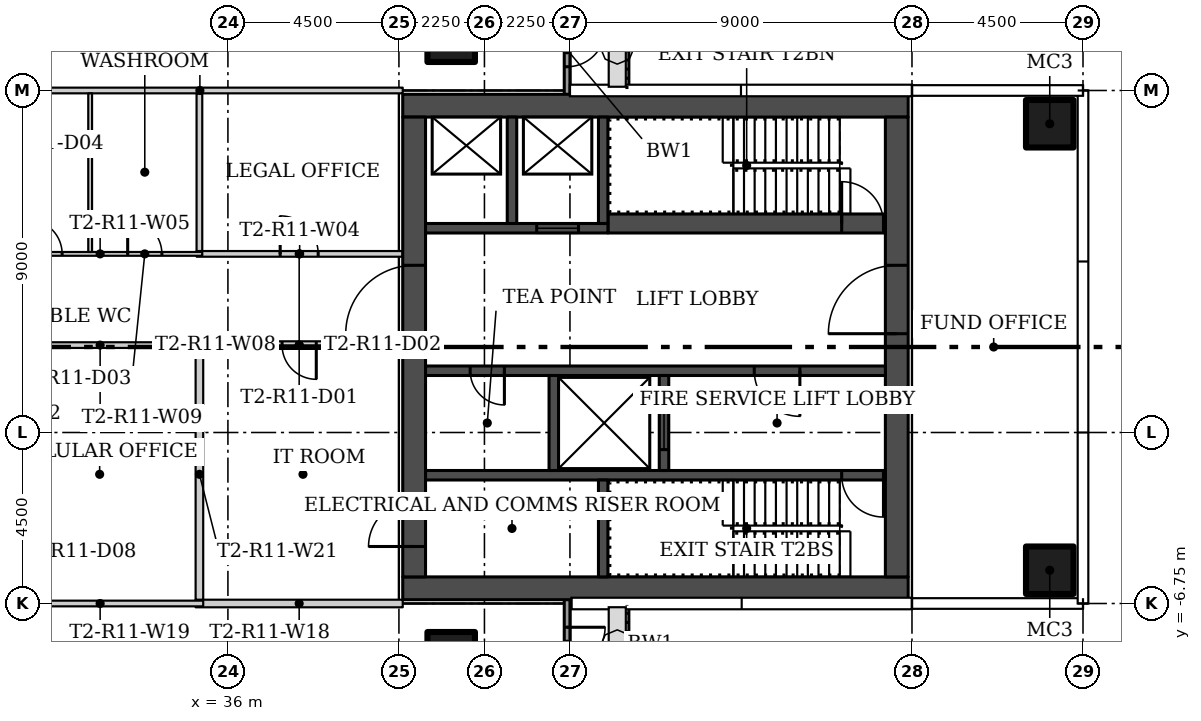
"""IFC4 building model, lengths in metres.
Left out: names, types, materials, properties, quantities, classifications, styles, units other than length and angle.
Written with IfcOpenShell. Run it as: python <this file> out.ifc"""

import sys

from ifc_helpers import new_model, si_unit, direction, frame, frame_2d, origin, origin_2d, place, context, subcontext, project, spatial, rectangle, hollow_rectangle, extrude, element, fill, save


model = new_model("IFC4")
c1 = context("Model", 3, precision=1e-05, world=origin(), true_north=direction((0.0, 1.0)))
c2 = subcontext(c1, "Body", "Model", "MODEL_VIEW")
j1 = project(units=[si_unit("LENGTHUNIT", "METRE"), si_unit("PLANEANGLEUNIT", "RADIAN")], contexts=[c1])
p1 = place(None, origin())
s1 = spatial("IfcSite", under=j1, at=p1, CompositionType="ELEMENT")
p2 = place(p1, origin())
s2 = spatial("IfcBuilding", under=s1, at=p2, CompositionType="ELEMENT")
p3 = place(p2, frame((0.0, 0.0, 109.2)))
s3 = spatial("IfcBuildingStorey", under=s2, at=p3, CompositionType="ELEMENT", Elevation=109.2)
for number, where in (
    (1, (41.875, 8.125, 0.0)),
    (2, (41.875, -8.125, 0.0)),
    (3, (57.625, -5.875, 0.0)),
    (4, (57.625, 5.875, 0.0)),
):
    element("IfcColumn", number, at=place(p3, frame(where)), inside=s3, PredefinedType="COLUMN", context=c2, shape_type="SweptSolid", body=[
        extrude(hollow_rectangle(XDim=1.25, YDim=1.25, WallThickness=0.05, at=origin_2d()), origin(), (0.0, 0.0, 1.0), 3.55),
    ])
p4 = place(p3, frame((35.175, 2.45, 0.0)))
e5 = element("IfcWall", 5, at=p4, inside=s3, PredefinedType="PARTITIONING", context=c2, shape_type="SweptSolid", body=[
    extrude(rectangle(XDim=5.425, YDim=0.15, at=frame_2d((2.712, 0.0))), origin(), (0.0, 0.0, 1.0), 3.55),
])
p5 = place(p4, frame((2.2, 0.0, 0.0)))
e6 = element("IfcOpeningElement", 6, at=p5, cuts=e5, PredefinedType="OPENING", context=c2, shape_type="SweptSolid", body=[
    extrude(rectangle(XDim=1.0, YDim=2.4, at=frame_2d((0.5, 1.2))), frame((0.0, 0.085, 0.0), z_axis=(0.0, -1.0, 0.0), x_axis=(1.0, 0.0, 0.0)), (0.0, 0.0, 1.0), 0.17),
])
p6 = place(p3, frame((29.95, 2.45, 0.0)))
e7 = element("IfcWall", 7, at=p6, inside=s3, PredefinedType="PARTITIONING", context=c2, shape_type="SweptSolid", body=[
    extrude(rectangle(XDim=5.375, YDim=0.1, at=frame_2d((2.688, 0.0))), origin(), (0.0, 0.0, 1.0), 3.55),
])
p7 = place(p6, frame((3.413, 0.0, 0.0)))
e8 = element("IfcOpeningElement", 8, at=p7, cuts=e7, PredefinedType="OPENING", context=c2, shape_type="SweptSolid", body=[
    extrude(rectangle(XDim=0.9, YDim=2.1, at=frame_2d((0.45, 1.05))), frame((0.0, 0.06, 0.0), z_axis=(0.0, -1.0, 0.0), x_axis=(1.0, 0.0, 0.0)), (0.0, 0.0, 1.0), 0.12),
])
p8 = place(p6, frame((0.788, 0.0, 0.0)))
e9 = element("IfcOpeningElement", 9, at=p8, cuts=e7, PredefinedType="OPENING", context=c2, shape_type="SweptSolid", body=[
    extrude(rectangle(XDim=0.9, YDim=2.1, at=frame_2d((0.45, 1.05))), frame((0.0, 0.06, 0.0), z_axis=(0.0, -1.0, 0.0), x_axis=(1.0, 0.0, 0.0)), (0.0, 0.0, 1.0), 0.12),
])
p9 = place(p3, frame((40.6, 0.05, 0.0), z_axis=(0.0, 0.0, 1.0), x_axis=(-1.0, 0.0, 0.0)))
e10 = element("IfcWall", 10, at=p9, inside=s3, PredefinedType="PARTITIONING", context=c2, shape_type="SweptSolid", body=[
    extrude(rectangle(XDim=5.45, YDim=0.2, at=frame_2d((2.725, 0.0))), origin(), (0.0, 0.0, 1.0), 3.55),
])
p10 = place(p9, frame((2.275, 0.0, 0.0)))
e11 = element("IfcOpeningElement", 11, at=p10, cuts=e10, PredefinedType="OPENING", context=c2, shape_type="SweptSolid", body=[
    extrude(rectangle(XDim=0.9, YDim=2.1, at=frame_2d((0.45, 1.05))), frame((0.0, 0.11, 0.0), z_axis=(0.0, -1.0, 0.0), x_axis=(1.0, 0.0, 0.0)), (0.0, 0.0, 1.0), 0.22),
])
p11 = place(p3, frame((35.35, 0.05, 0.0), z_axis=(0.0, 0.0, 1.0), x_axis=(-1.0, 0.0, 0.0)))
e12 = element("IfcWall", 12, at=p11, inside=s3, PredefinedType="PARTITIONING", context=c2, shape_type="SweptSolid", body=[
    extrude(rectangle(XDim=5.425, YDim=0.15, at=frame_2d((2.712, 0.0))), origin(), (0.0, 0.0, 1.0), 3.55),
])
p12 = place(p3, frame((29.925, 6.75, 0.0)))
e13 = element("IfcWall", 13, at=p12, inside=s3, PredefinedType="PARTITIONING", context=c2, shape_type="SweptSolid", body=[
    extrude(rectangle(XDim=10.675, YDim=0.15, at=frame_2d((5.337, 0.0))), origin(), (0.0, 0.0, 1.0), 3.55),
])
p13 = place(p3, frame((35.25, 6.675, 0.0), z_axis=(0.0, 0.0, 1.0), x_axis=(0.0, -1.0, 0.0)))
e14 = element("IfcWall", 14, at=p13, inside=s3, PredefinedType="PARTITIONING", context=c2, shape_type="SweptSolid", body=[
    extrude(rectangle(XDim=4.15, YDim=0.15, at=frame_2d((2.075, 0.0))), origin(), (0.0, 0.0, 1.0), 3.55),
])
p14 = place(p3, frame((32.375, 6.675, 0.0), z_axis=(0.0, 0.0, 1.0), x_axis=(0.0, -1.0, 0.0)))
e15 = element("IfcWall", 15, at=p14, inside=s3, PredefinedType="PARTITIONING", context=c2, shape_type="SweptSolid", body=[
    extrude(rectangle(XDim=4.175, YDim=0.1, at=frame_2d((2.087, 0.0))), origin(), (0.0, 0.0, 1.0), 3.55),
])
p15 = place(p3, frame((40.6, -6.75, 0.0), z_axis=(0.0, 0.0, 1.0), x_axis=(-1.0, 0.0, 0.0)))
e16 = element("IfcWall", 16, at=p15, inside=s3, PredefinedType="PARTITIONING", context=c2, shape_type="SweptSolid", body=[
    extrude(rectangle(XDim=5.45, YDim=0.2, at=frame_2d((2.725, 0.0))), origin(), (0.0, 0.0, 1.0), 3.55),
])
p16 = place(p3, frame((35.35, -6.75, 0.0), z_axis=(0.0, 0.0, 1.0), x_axis=(-1.0, 0.0, 0.0)))
e17 = element("IfcWall", 17, at=p16, inside=s3, PredefinedType="PARTITIONING", context=c2, shape_type="SweptSolid", body=[
    extrude(rectangle(XDim=5.425, YDim=0.15, at=frame_2d((2.712, 0.0))), origin(), (0.0, 0.0, 1.0), 3.55),
])
p17 = place(p3, frame((35.25, -0.05, 0.0), z_axis=(0.0, 0.0, 1.0), x_axis=(0.0, -1.0, 0.0)))
e18 = element("IfcWall", 18, at=p17, inside=s3, PredefinedType="PARTITIONING", context=c2, shape_type="SweptSolid", body=[
    extrude(rectangle(XDim=6.6, YDim=0.2, at=frame_2d((3.3, 0.0))), origin(), (0.0, 0.0, 1.0), 3.55),
])
p18 = place(p3, frame((44.925, 9.0, 0.0), z_axis=(0.0, 0.0, 1.0), x_axis=(0.0, -1.0, 0.0)))
e19 = element("IfcWall", 19, at=p18, inside=s3, PredefinedType="SOLIDWALL", context=c2, shape_type="SweptSolid", body=[
    extrude(rectangle(XDim=2.357, YDim=0.15, at=frame_2d((1.178, 0.0))), origin(), (0.0, 0.0, 1.0), 3.45),
])
p19 = place(p18, frame((0.625, 0.0, 0.0)))
e20 = element("IfcOpeningElement", 20, at=p19, cuts=e19, PredefinedType="OPENING", context=c2, shape_type="SweptSolid", body=[
    extrude(rectangle(XDim=1.0, YDim=2.4, at=frame_2d((0.5, 1.2))), frame((0.0, 0.085, 0.0), z_axis=(0.0, -1.0, 0.0), x_axis=(1.0, 0.0, 0.0)), (0.0, 0.0, 1.0), 0.17),
])
p20 = place(p3, frame((44.925, -6.643, 0.0), z_axis=(0.0, 0.0, 1.0), x_axis=(0.0, -1.0, 0.0)))
e21 = element("IfcWall", 21, at=p20, inside=s3, PredefinedType="SOLIDWALL", context=c2, shape_type="SweptSolid", body=[
    extrude(rectangle(XDim=2.357, YDim=0.15, at=frame_2d((1.178, 0.0))), origin(), (0.0, 0.0, 1.0), 3.45),
])
p21 = place(p20, frame((0.732, 0.0, 0.0)))
e22 = element("IfcOpeningElement", 22, at=p21, cuts=e21, PredefinedType="OPENING", context=c2, shape_type="SweptSolid", body=[
    extrude(rectangle(XDim=1.0, YDim=2.4, at=frame_2d((0.5, 1.2))), frame((0.0, 0.085, 0.0), z_axis=(0.0, -1.0, 0.0), x_axis=(1.0, 0.0, 0.0)), (0.0, 0.0, 1.0), 0.17),
])
for number, where, z_axis, x_axis in (
    (23, (53.9, -6.35, 0.0), (0.0, 0.0, 1.0), (-1.0, 0.0, 0.0)),
    (24, (53.9, 6.35, 0.0), (0.0, 0.0, 1.0), (-1.0, 0.0, 0.0)),
):
    element("IfcWall", number, at=place(p3, frame(where, z_axis=z_axis, x_axis=x_axis)), inside=s3, PredefinedType="SHEAR", context=c2, shape_type="SweptSolid", body=[
        extrude(rectangle(XDim=13.3, YDim=0.6, at=frame_2d((6.65, 0.0))), origin(), (0.0, 0.0, 1.0), 3.55),
    ])
p22 = place(p3, frame((53.6, -6.05, 0.0), z_axis=(0.0, 0.0, 1.0), x_axis=(0.0, 1.0, 0.0)))
e25 = element("IfcWall", 25, at=p22, inside=s3, PredefinedType="SHEAR", context=c2, shape_type="SweptSolid", body=[
    extrude(rectangle(XDim=12.1, YDim=0.6, at=frame_2d((6.05, 0.0))), origin(), (0.0, 0.0, 1.0), 3.55),
])
p23 = place(p22, frame((6.4, 0.0, 0.0)))
e26 = element("IfcOpeningElement", 26, at=p23, cuts=e25, PredefinedType="OPENING", context=c2, shape_type="SweptSolid", body=[
    extrude(rectangle(XDim=1.8, YDim=2.4, at=frame_2d((0.9, 1.2))), frame((0.0, 0.31, 0.0), z_axis=(0.0, -1.0, 0.0), x_axis=(1.0, 0.0, 0.0)), (0.0, 0.0, 1.0), 0.62),
])
p24 = place(p3, frame((40.9, -6.05, 0.0), z_axis=(0.0, 0.0, 1.0), x_axis=(0.0, 1.0, 0.0)))
e27 = element("IfcWall", 27, at=p24, inside=s3, PredefinedType="SHEAR", context=c2, shape_type="SweptSolid", body=[
    extrude(rectangle(XDim=12.1, YDim=0.6, at=frame_2d((6.05, 0.0))), origin(), (0.0, 0.0, 1.0), 3.55),
])
p25 = place(p24, frame((0.8, 0.0, 0.0)))
e28 = element("IfcOpeningElement", 28, at=p25, cuts=e27, PredefinedType="OPENING", context=c2, shape_type="SweptSolid", body=[
    extrude(rectangle(XDim=1.2, YDim=2.1, at=frame_2d((0.6, 1.05))), frame((0.0, 0.31, 0.0), z_axis=(0.0, -1.0, 0.0), x_axis=(1.0, 0.0, 0.0)), (0.0, 0.0, 1.0), 0.62),
])
p26 = place(p24, frame((6.4, 0.0, 0.0)))
e29 = element("IfcOpeningElement", 29, at=p26, cuts=e27, PredefinedType="OPENING", context=c2, shape_type="SweptSolid", body=[
    extrude(rectangle(XDim=1.8, YDim=2.4, at=frame_2d((0.9, 1.2))), frame((0.0, 0.31, 0.0), z_axis=(0.0, -1.0, 0.0), x_axis=(1.0, 0.0, 0.0)), (0.0, 0.0, 1.0), 0.62),
])
p27 = place(p3, frame((53.3, -3.375, 0.0), z_axis=(0.0, 0.0, 1.0), x_axis=(-1.0, 0.0, 0.0)))
e30 = element("IfcWall", 30, at=p27, inside=s3, PredefinedType="SHEAR", context=c2, shape_type="SweptSolid", body=[
    extrude(rectangle(XDim=12.1, YDim=0.25, at=frame_2d((6.05, 0.0))), origin(), (0.0, 0.0, 1.0), 3.55),
])
p28 = place(p27, frame((0.05, 0.0, 0.0)))
e31 = element("IfcOpeningElement", 31, at=p28, cuts=e30, PredefinedType="OPENING", context=c2, shape_type="SweptSolid", body=[
    extrude(rectangle(XDim=1.1, YDim=2.1, at=frame_2d((0.55, 1.05))), frame((0.0, 0.135, 0.0), z_axis=(0.0, -1.0, 0.0), x_axis=(1.0, 0.0, 0.0)), (0.0, 0.0, 1.0), 0.27),
])
p29 = place(p3, frame((45.875, -6.05, 0.0), z_axis=(0.0, 0.0, 1.0), x_axis=(0.0, 1.0, 0.0)))
e32 = element("IfcWall", 32, at=p29, inside=s3, PredefinedType="SHEAR", context=c2, shape_type="SweptSolid", body=[
    extrude(rectangle(XDim=2.55, YDim=0.25, at=frame_2d((1.275, 0.0))), origin(), (0.0, 0.0, 1.0), 3.55),
])
p30 = place(p3, frame((53.3, -0.625, 0.0), z_axis=(0.0, 0.0, 1.0), x_axis=(-1.0, 0.0, 0.0)))
e33 = element("IfcWall", 33, at=p30, inside=s3, PredefinedType="SHEAR", context=c2, shape_type="SweptSolid", body=[
    extrude(rectangle(XDim=12.1, YDim=0.25, at=frame_2d((6.05, 0.0))), origin(), (0.0, 0.0, 1.0), 3.55),
])
p31 = place(p30, frame((2.25, 0.0, 0.0)))
e34 = element("IfcOpeningElement", 34, at=p31, cuts=e33, PredefinedType="OPENING", context=c2, shape_type="SweptSolid", body=[
    extrude(rectangle(XDim=1.2, YDim=2.1, at=frame_2d((0.6, 1.05))), frame((0.0, 0.135, 0.0), z_axis=(0.0, -1.0, 0.0), x_axis=(1.0, 0.0, 0.0)), (0.0, 0.0, 1.0), 0.27),
])
p32 = place(p30, frame((10.025, 0.0, 0.0)))
e35 = element("IfcOpeningElement", 35, at=p32, cuts=e33, PredefinedType="OPENING", context=c2, shape_type="SweptSolid", body=[
    extrude(rectangle(XDim=0.9, YDim=2.1, at=frame_2d((0.45, 1.05))), frame((0.0, 0.135, 0.0), z_axis=(0.0, -1.0, 0.0), x_axis=(1.0, 0.0, 0.0)), (0.0, 0.0, 1.0), 0.27),
])
p33 = place(p3, frame((47.475, -3.25, 0.0), z_axis=(0.0, 0.0, 1.0), x_axis=(0.0, 1.0, 0.0)))
e36 = element("IfcWall", 36, at=p33, inside=s3, PredefinedType="SHEAR", context=c2, shape_type="SweptSolid", body=[
    extrude(rectangle(XDim=2.5, YDim=0.25, at=frame_2d((1.25, 0.0))), origin(), (0.0, 0.0, 1.0), 3.55),
])
p34 = place(p33, frame((0.55, 0.0, 0.0)))
e37 = element("IfcOpeningElement", 37, at=p34, cuts=e36, PredefinedType="OPENING", context=c2, shape_type="SweptSolid", body=[
    extrude(rectangle(XDim=1.4, YDim=2.4, at=frame_2d((0.7, 1.2))), frame((0.0, 0.135, 0.0), z_axis=(0.0, -1.0, 0.0), x_axis=(1.0, 0.0, 0.0)), (0.0, 0.0, 1.0), 0.27),
])
p35 = place(p3, frame((44.575, -3.25, 0.0), z_axis=(0.0, 0.0, 1.0), x_axis=(0.0, 1.0, 0.0)))
e38 = element("IfcWall", 38, at=p35, inside=s3, PredefinedType="SHEAR", context=c2, shape_type="SweptSolid", body=[
    extrude(rectangle(XDim=2.5, YDim=0.25, at=frame_2d((1.25, 0.0))), origin(), (0.0, 0.0, 1.0), 3.55),
])
p36 = place(p3, frame((46.0, 3.25, 0.0)))
e39 = element("IfcWall", 39, at=p36, inside=s3, PredefinedType="SHEAR", context=c2, shape_type="SweptSolid", body=[
    extrude(rectangle(XDim=7.3, YDim=0.5, at=frame_2d((3.65, 0.0))), origin(), (0.0, 0.0, 1.0), 3.55),
])
p37 = place(p36, frame((6.15, 0.0, 0.0)))
e40 = element("IfcOpeningElement", 40, at=p37, cuts=e39, PredefinedType="OPENING", context=c2, shape_type="SweptSolid", body=[
    extrude(rectangle(XDim=1.1, YDim=2.1, at=frame_2d((0.55, 1.05))), frame((0.0, 0.26, 0.0), z_axis=(0.0, -1.0, 0.0), x_axis=(1.0, 0.0, 0.0)), (0.0, 0.0, 1.0), 0.52),
])
p38 = place(p3, frame((46.0, 3.125, 0.0), z_axis=(0.0, 0.0, 1.0), x_axis=(-1.0, 0.0, 0.0)))
e41 = element("IfcWall", 41, at=p38, inside=s3, PredefinedType="SHEAR", context=c2, shape_type="SweptSolid", body=[
    extrude(rectangle(XDim=4.8, YDim=0.25, at=frame_2d((2.4, 0.0))), origin(), (0.0, 0.0, 1.0), 3.55),
])
p39 = place(p38, frame((0.775, 0.0, 0.0)))
e42 = element("IfcOpeningElement", 42, at=p39, cuts=e41, PredefinedType="OPENING", context=c2, shape_type="SweptSolid", body=[
    extrude(rectangle(XDim=1.1, YDim=2.1, at=frame_2d((0.55, 1.05))), frame((0.0, 0.135, 0.0), z_axis=(0.0, -1.0, 0.0), x_axis=(1.0, 0.0, 0.0)), (0.0, 0.0, 1.0), 0.27),
])
for number, where, z_axis, x_axis in (
    (43, (45.875, 3.25, 0.0), (0.0, 0.0, 1.0), (0.0, 1.0, 0.0)),
    (44, (43.475, 3.25, 0.0), (0.0, 0.0, 1.0), (0.0, 1.0, 0.0)),
):
    element("IfcWall", number, at=place(p3, frame(where, z_axis=z_axis, x_axis=x_axis)), inside=s3, PredefinedType="SHEAR", context=c2, shape_type="SweptSolid", body=[
        extrude(rectangle(XDim=2.8, YDim=0.25, at=frame_2d((1.4, 0.0))), origin(), (0.0, 0.0, 1.0), 3.55),
    ])
p40 = place(p5, origin())
e45 = element("IfcDoor", 45, at=p40, inside=s3, OperationType="SINGLE_SWING_LEFT", PredefinedType="DOOR", context=c2, shape_type="SweptSolid", body=[
    extrude(rectangle(XDim=1.0, YDim=2.4, at=frame_2d((0.5, 1.2))), frame((0.0, 0.025, 0.0), z_axis=(0.0, -1.0, 0.0), x_axis=(1.0, 0.0, 0.0)), (0.0, 0.0, 1.0), 0.05),
])
fill(e6, e45)
p41 = place(p10, origin())
e46 = element("IfcDoor", 46, at=p41, inside=s3, OperationType="SINGLE_SWING_LEFT", PredefinedType="DOOR", context=c2, shape_type="SweptSolid", body=[
    extrude(rectangle(XDim=0.9, YDim=2.1, at=frame_2d((0.45, 1.05))), frame((0.0, 0.025, 0.0), z_axis=(0.0, -1.0, 0.0), x_axis=(1.0, 0.0, 0.0)), (0.0, 0.0, 1.0), 0.05),
])
fill(e11, e46)
p42 = place(p7, origin())
e47 = element("IfcDoor", 47, at=p42, inside=s3, OperationType="SINGLE_SWING_RIGHT", PredefinedType="DOOR", context=c2, shape_type="SweptSolid", body=[
    extrude(rectangle(XDim=0.9, YDim=2.1, at=frame_2d((0.45, 1.05))), frame((0.0, 0.025, 0.0), z_axis=(0.0, -1.0, 0.0), x_axis=(1.0, 0.0, 0.0)), (0.0, 0.0, 1.0), 0.05),
])
fill(e8, e47)
p43 = place(p8, origin())
e48 = element("IfcDoor", 48, at=p43, inside=s3, OperationType="SINGLE_SWING_LEFT", PredefinedType="DOOR", context=c2, shape_type="SweptSolid", body=[
    extrude(rectangle(XDim=0.9, YDim=2.1, at=frame_2d((0.45, 1.05))), frame((0.0, 0.025, 0.0), z_axis=(0.0, -1.0, 0.0), x_axis=(1.0, 0.0, 0.0)), (0.0, 0.0, 1.0), 0.05),
])
fill(e9, e48)
p44 = place(p19, origin())
e49 = element("IfcDoor", 49, at=p44, inside=s3, OperationType="SINGLE_SWING_LEFT", PredefinedType="DOOR", context=c2, shape_type="SweptSolid", body=[
    extrude(rectangle(XDim=1.0, YDim=2.4, at=frame_2d((0.5, 1.2))), frame((0.0, 0.025, 0.0), z_axis=(0.0, -1.0, 0.0), x_axis=(1.0, 0.0, 0.0)), (0.0, 0.0, 1.0), 0.05),
])
fill(e20, e49)
p45 = place(p21, origin())
e50 = element("IfcDoor", 50, at=p45, inside=s3, OperationType="SINGLE_SWING_RIGHT", PredefinedType="DOOR", context=c2, shape_type="SweptSolid", body=[
    extrude(rectangle(XDim=1.0, YDim=2.4, at=frame_2d((0.5, 1.2))), frame((0.0, 0.025, 0.0), z_axis=(0.0, -1.0, 0.0), x_axis=(1.0, 0.0, 0.0)), (0.0, 0.0, 1.0), 0.05),
])
fill(e22, e50)
p46 = place(p23, origin())
e51 = element("IfcDoor", 51, at=p46, inside=s3, OperationType="DOUBLE_DOOR_SINGLE_SWING", PredefinedType="DOOR", context=c2, shape_type="SweptSolid", body=[
    extrude(rectangle(XDim=1.8, YDim=2.4, at=frame_2d((0.9, 1.2))), frame((0.0, 0.025, 0.0), z_axis=(0.0, -1.0, 0.0), x_axis=(1.0, 0.0, 0.0)), (0.0, 0.0, 1.0), 0.05),
])
fill(e26, e51)
p47 = place(p25, origin())
e52 = element("IfcDoor", 52, at=p47, inside=s3, OperationType="SINGLE_SWING_LEFT", PredefinedType="DOOR", context=c2, shape_type="SweptSolid", body=[
    extrude(rectangle(XDim=1.2, YDim=2.1, at=frame_2d((0.6, 1.05))), frame((0.0, 0.025, 0.0), z_axis=(0.0, -1.0, 0.0), x_axis=(1.0, 0.0, 0.0)), (0.0, 0.0, 1.0), 0.05),
])
fill(e28, e52)
p48 = place(p26, origin())
e53 = element("IfcDoor", 53, at=p48, inside=s3, OperationType="DOUBLE_DOOR_SINGLE_SWING", PredefinedType="DOOR", context=c2, shape_type="SweptSolid", body=[
    extrude(rectangle(XDim=1.8, YDim=2.4, at=frame_2d((0.9, 1.2))), frame((0.0, 0.025, 0.0), z_axis=(0.0, -1.0, 0.0), x_axis=(1.0, 0.0, 0.0)), (0.0, 0.0, 1.0), 0.05),
])
fill(e29, e53)
p49 = place(p28, origin())
e54 = element("IfcDoor", 54, at=p49, inside=s3, OperationType="SINGLE_SWING_LEFT", PredefinedType="DOOR", context=c2, shape_type="SweptSolid", body=[
    extrude(rectangle(XDim=1.1, YDim=2.1, at=frame_2d((0.55, 1.05))), frame((0.0, 0.025, 0.0), z_axis=(0.0, -1.0, 0.0), x_axis=(1.0, 0.0, 0.0)), (0.0, 0.0, 1.0), 0.05),
])
fill(e31, e54)
p50 = place(p31, origin())
e55 = element("IfcDoor", 55, at=p50, inside=s3, OperationType="SINGLE_SWING_LEFT", PredefinedType="DOOR", context=c2, shape_type="SweptSolid", body=[
    extrude(rectangle(XDim=1.2, YDim=2.1, at=frame_2d((0.6, 1.05))), frame((0.0, 0.025, 0.0), z_axis=(0.0, -1.0, 0.0), x_axis=(1.0, 0.0, 0.0)), (0.0, 0.0, 1.0), 0.05),
])
fill(e34, e55)
p51 = place(p32, origin())
e56 = element("IfcDoor", 56, at=p51, inside=s3, OperationType="SINGLE_SWING_RIGHT", PredefinedType="DOOR", context=c2, shape_type="SweptSolid", body=[
    extrude(rectangle(XDim=0.9, YDim=2.1, at=frame_2d((0.45, 1.05))), frame((0.0, 0.025, 0.0), z_axis=(0.0, -1.0, 0.0), x_axis=(1.0, 0.0, 0.0)), (0.0, 0.0, 1.0), 0.05),
])
fill(e35, e56)
p52 = place(p34, origin())
e57 = element("IfcDoor", 57, at=p52, inside=s3, OperationType="SLIDING_TO_LEFT", PredefinedType="DOOR", context=c2, shape_type="SweptSolid", body=[
    extrude(rectangle(XDim=1.4, YDim=2.4, at=frame_2d((0.7, 1.2))), frame((0.0, 0.025, 0.0), z_axis=(0.0, -1.0, 0.0), x_axis=(1.0, 0.0, 0.0)), (0.0, 0.0, 1.0), 0.05),
])
fill(e37, e57)
p53 = place(p37, origin())
e58 = element("IfcDoor", 58, at=p53, inside=s3, OperationType="SINGLE_SWING_RIGHT", PredefinedType="DOOR", context=c2, shape_type="SweptSolid", body=[
    extrude(rectangle(XDim=1.1, YDim=2.1, at=frame_2d((0.55, 1.05))), frame((0.0, 0.025, 0.0), z_axis=(0.0, -1.0, 0.0), x_axis=(1.0, 0.0, 0.0)), (0.0, 0.0, 1.0), 0.05),
])
fill(e40, e58)
p54 = place(p39, origin())
e59 = element("IfcDoor", 59, at=p54, inside=s3, OperationType="SLIDING_TO_LEFT", PredefinedType="DOOR", context=c2, shape_type="SweptSolid", body=[
    extrude(rectangle(XDim=1.1, YDim=2.1, at=frame_2d((0.55, 1.05))), frame((0.0, 0.025, 0.0), z_axis=(0.0, -1.0, 0.0), x_axis=(1.0, 0.0, 0.0)), (0.0, 0.0, 1.0), 0.05),
])
fill(e42, e59)
save(model, sys.argv[1])
